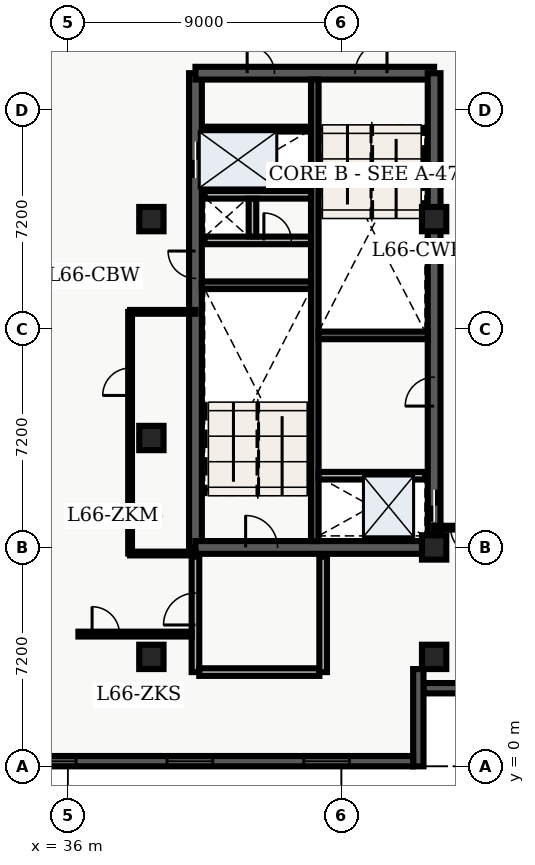
"""IFC4 building model, lengths in metres.
Left out: names, types, materials, properties, quantities, classifications, styles, units other than length and angle.
Written with IfcOpenShell. Run it as: python <this file> out.ifc"""

import sys

from ifc_helpers import new_model, entity, si_unit, converted_unit, direction, frame, origin_with_axes, origin_2d_with_axis, place, context, subcontext, project, spatial, polyline, rectangle, outline, extrude, element, fill, save


model = new_model("IFC4")
c1 = context("Model", 3, precision=1e-05, world=origin_with_axes(), true_north=direction((0.0, 1.0)))
c2 = subcontext(c1, "Body", "Model", "MODEL_VIEW")
j1 = project(units=[si_unit("LENGTHUNIT", "METRE"), converted_unit("PLANEANGLEUNIT", "DEGREE", entity("IfcPlaneAngleMeasure", 0.017), si_unit("PLANEANGLEUNIT", "RADIAN"), dimensions=[0, 0, 0, 0, 0, 0, 0])], contexts=[c1])
p1 = place(None, origin_with_axes())
s1 = spatial("IfcSite", under=j1, at=p1, CompositionType="ELEMENT")
p2 = place(p1, origin_with_axes())
s2 = spatial("IfcBuilding", under=s1, at=p2, CompositionType="ELEMENT")
p3 = place(p2, frame((0.0, 0.0, 268.5), z_axis=(0.0, 0.0, 1.0), x_axis=(1.0, 0.0, 0.0)))
s3 = spatial("IfcBuildingStorey", under=s2, at=p3, CompositionType="ELEMENT", Elevation=268.5)
p4 = place(p3, frame((40.2, 7.2, 0.0), z_axis=(0.0, 0.0, 1.0), x_axis=(0.0, 1.0, 0.0)))
e1 = element("IfcWall", 1, at=p4, inside=s3, PredefinedType="SHEAR", context=c2, shape_type="SweptSolid", body=[
    extrude(outline(polyline([(0.0, -0.21), (15.6, -0.21), (15.6, 0.21), (0.0, 0.21), (0.0, -0.21)])), origin_with_axes(), (0.0, 0.0, 1.0), 3.66),
])
p5 = place(p4, frame((12.75, 0.0, 0.0), z_axis=(0.0, 0.0, 1.0), x_axis=(1.0, 0.0, 0.0)))
e2 = element("IfcOpeningElement", 2, at=p5, cuts=e1, PredefinedType="OPENING", context=c2, shape_type="SweptSolid", body=[
    extrude(rectangle(XDim=1.2, YDim=0.44, at=origin_2d_with_axis()), origin_with_axes(), (0.0, 0.0, 1.0), 2.15),
])
p6 = place(p4, frame((9.3, 0.0, 0.0), z_axis=(0.0, 0.0, 1.0), x_axis=(1.0, 0.0, 0.0)))
e3 = element("IfcOpeningElement", 3, at=p6, cuts=e1, PredefinedType="OPENING", context=c2, shape_type="SweptSolid", body=[
    extrude(rectangle(XDim=0.9, YDim=0.44, at=origin_2d_with_axis()), origin_with_axes(), (0.0, 0.0, 1.0), 2.15),
])
p7 = place(p3, frame((40.2, 7.2, 0.0), z_axis=(0.0, 0.0, 1.0), x_axis=(1.0, 0.0, 0.0)))
e4 = element("IfcWall", 4, at=p7, inside=s3, PredefinedType="SHEAR", context=c2, shape_type="SweptSolid", body=[
    extrude(outline(polyline([(0.0, -0.21), (7.85, -0.21), (7.85, 0.21), (0.0, 0.21), (0.0, -0.21)])), origin_with_axes(), (0.0, 0.0, 1.0), 3.66),
])
p8 = place(p7, frame((2.175, 0.0, 0.0), z_axis=(0.0, 0.0, 1.0), x_axis=(1.0, 0.0, 0.0)))
e5 = element("IfcOpeningElement", 5, at=p8, cuts=e4, PredefinedType="OPENING", context=c2, shape_type="SweptSolid", body=[
    extrude(rectangle(XDim=1.05, YDim=0.44, at=origin_2d_with_axis()), origin_with_axes(), (0.0, 0.0, 1.0), 2.15),
])
p9 = place(p3, frame((40.2, 22.8, 0.0), z_axis=(0.0, 0.0, 1.0), x_axis=(1.0, 0.0, 0.0)))
e6 = element("IfcWall", 6, at=p9, inside=s3, PredefinedType="SHEAR", context=c2, shape_type="SweptSolid", body=[
    extrude(outline(polyline([(0.0, -0.21), (7.85, -0.21), (7.85, 0.21), (0.0, 0.21), (0.0, -0.21)])), origin_with_axes(), (0.0, 0.0, 1.0), 3.66),
])
p10 = place(p9, frame((5.775, 0.0, 0.0), z_axis=(0.0, 0.0, 1.0), x_axis=(1.0, 0.0, 0.0)))
e7 = element("IfcOpeningElement", 7, at=p10, cuts=e6, PredefinedType="OPENING", context=c2, shape_type="SweptSolid", body=[
    extrude(rectangle(XDim=1.05, YDim=0.44, at=origin_2d_with_axis()), origin_with_axes(), (0.0, 0.0, 1.0), 2.15),
])
p11 = place(p9, frame((2.15, 0.0, 0.0), z_axis=(0.0, 0.0, 1.0), x_axis=(1.0, 0.0, 0.0)))
e8 = element("IfcOpeningElement", 8, at=p11, cuts=e6, PredefinedType="OPENING", context=c2, shape_type="SweptSolid", body=[
    extrude(rectangle(XDim=0.9, YDim=0.44, at=origin_2d_with_axis()), origin_with_axes(), (0.0, 0.0, 1.0), 2.15),
])
p12 = place(p3, frame((48.05, 7.2, 0.0), z_axis=(0.0, 0.0, 1.0), x_axis=(0.0, 1.0, 0.0)))
e9 = element("IfcWall", 9, at=p12, inside=s3, PredefinedType="SHEAR", context=c2, shape_type="SweptSolid", body=[
    extrude(outline(polyline([(0.0, -0.21), (15.6, -0.21), (15.6, 0.21), (0.0, 0.21), (0.0, -0.21)])), origin_with_axes(), (0.0, 0.0, 1.0), 3.66),
])
p13 = place(p12, frame((1.375, 0.0, 0.0), z_axis=(0.0, 0.0, 1.0), x_axis=(1.0, 0.0, 0.0)))
e10 = element("IfcOpeningElement", 10, at=p13, cuts=e9, PredefinedType="OPENING", context=c2, shape_type="SweptSolid", body=[
    extrude(rectangle(XDim=1.05, YDim=0.44, at=origin_2d_with_axis()), origin_with_axes(), (0.0, 0.0, 1.0), 2.15),
])
p14 = place(p12, frame((5.125, 0.0, 0.0), z_axis=(0.0, 0.0, 1.0), x_axis=(1.0, 0.0, 0.0)))
e11 = element("IfcOpeningElement", 11, at=p14, cuts=e9, PredefinedType="OPENING", context=c2, shape_type="SweptSolid", body=[
    extrude(rectangle(XDim=0.95, YDim=0.44, at=origin_2d_with_axis()), origin_with_axes(), (0.0, 0.0, 1.0), 2.15),
])
p15 = place(p3, frame((44.125, 7.41, 0.0), z_axis=(0.0, 0.0, 1.0), x_axis=(0.0, 1.0, 0.0)))
e12 = element("IfcWall", 12, at=p15, inside=s3, PredefinedType="SHEAR", context=c2, shape_type="SweptSolid", body=[
    extrude(outline(polyline([(0.0, -0.125), (15.18, -0.125), (15.18, 0.125), (0.0, 0.125), (0.0, -0.125)])), origin_with_axes(), (0.0, 0.0, 1.0), 3.66),
])
for number, where, z_axis, x_axis in (
    (13, (40.41, 15.825, 0.0), (0.0, 0.0, 1.0), (1.0, 0.0, 0.0)),
    (14, (44.25, 14.175, 0.0), (0.0, 0.0, 1.0), (1.0, 0.0, 0.0)),
):
    element("IfcWall", number, at=place(p3, frame(where, z_axis=z_axis, x_axis=x_axis)), inside=s3, PredefinedType="SHEAR", context=c2, shape_type="SweptSolid", body=[
        extrude(outline(polyline([(0.0, -0.125), (3.59, -0.125), (3.59, 0.125), (0.0, 0.125), (0.0, -0.125)])), origin_with_axes(), (0.0, 0.0, 1.0), 3.66),
    ])
p16 = place(p3, frame((40.5, 17.3, 0.0), z_axis=(0.0, 0.0, 1.0), x_axis=(1.0, 0.0, 0.0)))
e15 = element("IfcWall", 15, at=p16, inside=s3, PredefinedType="SOLIDWALL", context=c2, shape_type="SweptSolid", body=[
    extrude(outline(polyline([(0.0, -0.125), (3.5, -0.125), (3.5, 0.125), (0.0, 0.125), (0.0, -0.125)])), origin_with_axes(), (0.0, 0.0, 1.0), 2.7),
])
p17 = place(p16, frame((2.4, 0.0, 0.0), z_axis=(0.0, 0.0, 1.0), x_axis=(1.0, 0.0, 0.0)))
e16 = element("IfcOpeningElement", 16, at=p17, cuts=e15, PredefinedType="OPENING", context=c2, shape_type="SweptSolid", body=[
    extrude(rectangle(XDim=0.9, YDim=0.27, at=origin_2d_with_axis()), origin_with_axes(), (0.0, 0.0, 1.0), 2.15),
])
p18 = place(p3, frame((40.5, 18.8, 0.0), z_axis=(0.0, 0.0, 1.0), x_axis=(1.0, 0.0, 0.0)))
e17 = element("IfcWall", 17, at=p18, inside=s3, PredefinedType="SOLIDWALL", context=c2, shape_type="SweptSolid", body=[
    extrude(outline(polyline([(0.0, -0.125), (3.5, -0.125), (3.5, 0.125), (0.0, 0.125), (0.0, -0.125)])), origin_with_axes(), (0.0, 0.0, 1.0), 2.7),
])
p19 = place(p3, frame((42.075, 17.43, 0.0), z_axis=(0.0, 0.0, 1.0), x_axis=(0.0, 1.0, 0.0)))
e18 = element("IfcWall", 18, at=p19, inside=s3, PredefinedType="SOLIDWALL", context=c2, shape_type="SweptSolid", body=[
    extrude(outline(polyline([(0.0, -0.125), (1.24, -0.125), (1.24, 0.125), (0.0, 0.125), (0.0, -0.125)])), origin_with_axes(), (0.0, 0.0, 1.0), 2.7),
])
p20 = place(p3, frame((40.2, 3.1, 0.0), z_axis=(0.0, 0.0, 1.0), x_axis=(0.0, 1.0, 0.0)))
e19 = element("IfcWall", 19, at=p20, inside=s3, PredefinedType="SOLIDWALL", context=c2, shape_type="SweptSolid", body=[
    extrude(outline(polyline([(0.0, -0.125), (3.8, -0.125), (3.8, 0.125), (0.0, 0.125), (0.0, -0.125)])), origin_with_axes(), (0.0, 0.0, 1.0), 2.7),
])
p21 = place(p20, frame((2.075, 0.0, 0.0), z_axis=(0.0, 0.0, 1.0), x_axis=(1.0, 0.0, 0.0)))
e20 = element("IfcOpeningElement", 20, at=p21, cuts=e19, PredefinedType="OPENING", context=c2, shape_type="SweptSolid", body=[
    extrude(rectangle(XDim=1.05, YDim=0.27, at=origin_2d_with_axis()), origin_with_axes(), (0.0, 0.0, 1.0), 2.15),
])
p22 = place(p3, frame((40.325, 3.1, 0.0), z_axis=(0.0, 0.0, 1.0), x_axis=(1.0, 0.0, 0.0)))
e21 = element("IfcWall", 21, at=p22, inside=s3, PredefinedType="SOLIDWALL", context=c2, shape_type="SweptSolid", body=[
    extrude(outline(polyline([(0.0, -0.125), (3.95, -0.125), (3.95, 0.125), (0.0, 0.125), (0.0, -0.125)])), origin_with_axes(), (0.0, 0.0, 1.0), 2.7),
])
p23 = place(p3, frame((44.4, 3.1, 0.0), z_axis=(0.0, 0.0, 1.0), x_axis=(0.0, 1.0, 0.0)))
e22 = element("IfcWall", 22, at=p23, inside=s3, PredefinedType="SOLIDWALL", context=c2, shape_type="SweptSolid", body=[
    extrude(outline(polyline([(0.0, -0.125), (3.8, -0.125), (3.8, 0.125), (0.0, 0.125), (0.0, -0.125)])), origin_with_axes(), (0.0, 0.0, 1.0), 2.7),
])
for number, where, z_axis, x_axis in (
    (23, (38.75, 3.6, 0.0), (0.0, 0.0, 1.0), (1.0, 0.0, 0.0)),
    (24, (38.75, 10.8, 0.0), (0.0, 0.0, 1.0), (1.0, 0.0, 0.0)),
    (25, (38.75, 18.0, 0.0), (0.0, 0.0, 1.0), (1.0, 0.0, 0.0)),
    (26, (48.05, 3.6, 0.0), (0.0, 0.0, 1.0), (1.0, 0.0, 0.0)),
    (27, (48.05, 7.2, 0.0), (0.0, 0.0, 1.0), (1.0, 0.0, 0.0)),
    (28, (48.05, 18.0, 0.0), (0.0, 0.0, 1.0), (1.0, 0.0, 0.0)),
):
    element("IfcColumn", number, at=place(p3, frame(where, z_axis=z_axis, x_axis=x_axis)), inside=s3, PredefinedType="COLUMN", context=c2, shape_type="SweptSolid", body=[
        extrude(rectangle(XDim=0.8, YDim=0.8, at=origin_2d_with_axis()), origin_with_axes(), (0.0, 0.0, 1.0), 3.9),
    ])
p24 = place(p3, frame((40.5, 20.96, 0.0), z_axis=(0.0, 0.0, 1.0), x_axis=(1.0, 0.0, 0.0)))
e29 = element("IfcWall", 29, at=p24, inside=s3, PredefinedType="PARTITIONING", context=c2, shape_type="SweptSolid", body=[
    extrude(outline(polyline([(0.0, -0.08), (3.5, -0.08), (3.5, 0.08), (0.0, 0.08), (0.0, -0.08)])), origin_with_axes(), (0.0, 0.0, 1.0), 2.7),
])
p25 = place(p3, frame((44.25, 9.56, 0.0), z_axis=(0.0, 0.0, 1.0), x_axis=(1.0, 0.0, 0.0)))
e30 = element("IfcWall", 30, at=p25, inside=s3, PredefinedType="SOLIDWALL", context=c2, shape_type="SweptSolid", body=[
    extrude(outline(polyline([(0.0, -0.125), (3.5, -0.125), (3.5, 0.125), (0.0, 0.125), (0.0, -0.125)])), origin_with_axes(), (0.0, 0.0, 1.0), 2.7),
])
p26 = place(p3, frame((49.765, 7.85, 0.0), z_axis=(0.0, 0.0, 1.0), x_axis=(-1.0, 0.0, 0.0)))
e31 = element("IfcWall", 31, at=p26, inside=s3, PredefinedType="PARTITIONING", context=c2, shape_type="SweptSolid", body=[
    extrude(outline(polyline([(0.0, -0.062), (1.715, -0.062), (1.715, 0.062), (0.0, 0.062), (0.0, -0.062)])), origin_with_axes(), (0.0, 0.0, 1.0), 2.7),
])
p27 = place(p26, frame((0.725, 0.0, 0.0), z_axis=(0.0, 0.0, 1.0), x_axis=(1.0, 0.0, 0.0)))
e32 = element("IfcOpeningElement", 32, at=p27, cuts=e31, PredefinedType="OPENING", context=c2, shape_type="SweptSolid", body=[
    extrude(rectangle(XDim=0.9, YDim=0.145, at=origin_2d_with_axis()), origin_with_axes(), (0.0, 0.0, 1.0), 2.15),
])
p28 = place(p3, frame((36.35, 4.35, 0.0), z_axis=(0.0, 0.0, 1.0), x_axis=(1.0, 0.0, 0.0)))
e33 = element("IfcWall", 33, at=p28, inside=s3, PredefinedType="PARTITIONING", context=c2, shape_type="SweptSolid", body=[
    extrude(outline(polyline([(0.0, -0.08), (3.725, -0.08), (3.725, 0.08), (0.0, 0.08), (0.0, -0.08)])), origin_with_axes(), (0.0, 0.0, 1.0), 2.7),
])
p29 = place(p28, frame((0.9, 0.0, 0.0), z_axis=(0.0, 0.0, 1.0), x_axis=(1.0, 0.0, 0.0)))
e34 = element("IfcOpeningElement", 34, at=p29, cuts=e33, PredefinedType="OPENING", context=c2, shape_type="SweptSolid", body=[
    extrude(rectangle(XDim=0.9, YDim=0.18, at=origin_2d_with_axis()), origin_with_axes(), (0.0, 0.0, 1.0), 2.15),
])
for number, where, z_axis, x_axis in (
    (35, (38.05, 7.0, 0.0), (0.0, 0.0, 1.0), (1.0, 0.0, 0.0)),
    (36, (38.05, 14.95, 0.0), (0.0, 0.0, 1.0), (1.0, 0.0, 0.0)),
):
    element("IfcWall", number, at=place(p3, frame(where, z_axis=z_axis, x_axis=x_axis)), inside=s3, PredefinedType="PARTITIONING", context=c2, shape_type="SweptSolid", body=[
        extrude(outline(polyline([(0.0, -0.062), (2.15, -0.062), (2.15, 0.062), (0.0, 0.062), (0.0, -0.062)])), origin_with_axes(), (0.0, 0.0, 1.0), 2.7),
    ])
p30 = place(p3, frame((38.05, 7.0, 0.0), z_axis=(0.0, 0.0, 1.0), x_axis=(0.0, 1.0, 0.0)))
e37 = element("IfcWall", 37, at=p30, inside=s3, PredefinedType="PARTITIONING", context=c2, shape_type="SweptSolid", body=[
    extrude(outline(polyline([(0.0, -0.062), (7.95, -0.062), (7.95, 0.062), (0.0, 0.062), (0.0, -0.062)])), origin_with_axes(), (0.0, 0.0, 1.0), 2.7),
])
p31 = place(p30, frame((5.65, 0.0, 0.0), z_axis=(0.0, 0.0, 1.0), x_axis=(1.0, 0.0, 0.0)))
e38 = element("IfcOpeningElement", 38, at=p31, cuts=e37, PredefinedType="OPENING", context=c2, shape_type="SweptSolid", body=[
    extrude(rectangle(XDim=0.9, YDim=0.145, at=origin_2d_with_axis()), origin_with_axes(), (0.0, 0.0, 1.0), 2.15),
])
p32 = place(p3, frame((49.76, 2.57, 0.0), z_axis=(0.0, 0.0, 1.0), x_axis=(-1.0, 0.0, 0.0)))
e39 = element("IfcWall", 39, at=p32, inside=s3, PredefinedType="SOLIDWALL", context=c2, shape_type="SweptSolid", body=[
    extrude(outline(polyline([(0.0, -0.17), (2.06, -0.17), (2.06, 0.17), (0.0, 0.17), (0.0, -0.17)])), origin_with_axes(), (0.0, 0.0, 1.0), 3.66),
])
p33 = place(p3, frame((47.53, 3.2, 0.0), z_axis=(0.0, 0.0, 1.0), x_axis=(0.0, -1.0, 0.0)))
e40 = element("IfcWall", 40, at=p33, inside=s3, PredefinedType="SOLIDWALL", context=c2, shape_type="SweptSolid", body=[
    extrude(outline(polyline([(0.0, -0.17), (3.2, -0.17), (3.2, 0.17), (0.0, 0.17), (0.0, -0.17)])), origin_with_axes(), (0.0, 0.0, 1.0), 3.66),
])
p34 = place(p3, frame((47.36, 0.17, 0.0), z_axis=(0.0, 0.0, 1.0), x_axis=(-1.0, 0.0, 0.0)))
e41 = element("IfcWall", 41, at=p34, inside=s3, PredefinedType="SOLIDWALL", context=c2, shape_type="SweptSolid", body=[
    extrude(outline(polyline([(0.0, -0.17), (37.16, -0.17), (37.16, 0.17), (0.0, 0.17), (0.0, -0.17)])), origin_with_axes(), (0.0, 0.0, 1.0), 3.66),
])
p35 = place(p34, frame((2.847, 0.0, 0.45), z_axis=(0.0, 0.0, 1.0), x_axis=(1.0, 0.0, 0.0)))
e42 = element("IfcOpeningElement", 42, at=p35, cuts=e41, PredefinedType="OPENING", context=c2, shape_type="SweptSolid", body=[
    extrude(rectangle(XDim=1.5, YDim=0.36, at=origin_2d_with_axis()), origin_with_axes(), (0.0, 0.0, 1.0), 2.1),
])
p36 = place(p34, frame((7.342, 0.0, 0.45), z_axis=(0.0, 0.0, 1.0), x_axis=(1.0, 0.0, 0.0)))
e43 = element("IfcOpeningElement", 43, at=p36, cuts=e41, PredefinedType="OPENING", context=c2, shape_type="SweptSolid", body=[
    extrude(rectangle(XDim=1.5, YDim=0.36, at=origin_2d_with_axis()), origin_with_axes(), (0.0, 0.0, 1.0), 2.1),
])
p37 = place(p34, frame((11.837, 0.0, 0.45), z_axis=(0.0, 0.0, 1.0), x_axis=(1.0, 0.0, 0.0)))
e44 = element("IfcOpeningElement", 44, at=p37, cuts=e41, PredefinedType="OPENING", context=c2, shape_type="SweptSolid", body=[
    extrude(rectangle(XDim=1.5, YDim=0.36, at=origin_2d_with_axis()), origin_with_axes(), (0.0, 0.0, 1.0), 2.1),
])
p38 = place(p34, frame((16.332, 0.0, 0.45), z_axis=(0.0, 0.0, 1.0), x_axis=(1.0, 0.0, 0.0)))
e45 = element("IfcOpeningElement", 45, at=p38, cuts=e41, PredefinedType="OPENING", context=c2, shape_type="SweptSolid", body=[
    extrude(rectangle(XDim=1.5, YDim=0.36, at=origin_2d_with_axis()), origin_with_axes(), (0.0, 0.0, 1.0), 2.1),
])
p39 = place(p34, frame((20.827, 0.0, 0.45), z_axis=(0.0, 0.0, 1.0), x_axis=(1.0, 0.0, 0.0)))
e46 = element("IfcOpeningElement", 46, at=p39, cuts=e41, PredefinedType="OPENING", context=c2, shape_type="SweptSolid", body=[
    extrude(rectangle(XDim=1.5, YDim=0.36, at=origin_2d_with_axis()), origin_with_axes(), (0.0, 0.0, 1.0), 2.1),
])
p40 = place(p34, frame((25.322, 0.0, 0.45), z_axis=(0.0, 0.0, 1.0), x_axis=(1.0, 0.0, 0.0)))
e47 = element("IfcOpeningElement", 47, at=p40, cuts=e41, PredefinedType="OPENING", context=c2, shape_type="SweptSolid", body=[
    extrude(rectangle(XDim=1.5, YDim=0.36, at=origin_2d_with_axis()), origin_with_axes(), (0.0, 0.0, 1.0), 2.1),
])
p41 = place(p34, frame((29.817, 0.0, 0.45), z_axis=(0.0, 0.0, 1.0), x_axis=(1.0, 0.0, 0.0)))
e48 = element("IfcOpeningElement", 48, at=p41, cuts=e41, PredefinedType="OPENING", context=c2, shape_type="SweptSolid", body=[
    extrude(rectangle(XDim=1.5, YDim=0.36, at=origin_2d_with_axis()), origin_with_axes(), (0.0, 0.0, 1.0), 2.1),
])
p42 = place(p34, frame((34.312, 0.0, 0.45), z_axis=(0.0, 0.0, 1.0), x_axis=(1.0, 0.0, 0.0)))
e49 = element("IfcOpeningElement", 49, at=p42, cuts=e41, PredefinedType="OPENING", context=c2, shape_type="SweptSolid", body=[
    extrude(rectangle(XDim=1.5, YDim=0.36, at=origin_2d_with_axis()), origin_with_axes(), (0.0, 0.0, 1.0), 2.1),
])
p43 = place(p12, frame((1.375, 0.0, 0.0), z_axis=(0.0, 0.0, 1.0), x_axis=(1.0, 0.0, 0.0)))
e50 = element("IfcDoor", 50, at=p43, inside=s3, OperationType="SLIDING_TO_LEFT", PredefinedType="DOOR", context=c2, shape_type="SweptSolid", body=[
    extrude(rectangle(XDim=1.05, YDim=0.09, at=origin_2d_with_axis()), origin_with_axes(), (0.0, 0.0, 1.0), 2.15),
])
fill(e10, e50)
p44 = place(p4, frame((12.75, 0.0, 0.0), z_axis=(0.0, 0.0, 1.0), x_axis=(1.0, 0.0, 0.0)))
e51 = element("IfcDoor", 51, at=p44, inside=s3, OperationType="DOUBLE_DOOR_SLIDING", PredefinedType="DOOR", context=c2, shape_type="SweptSolid", body=[
    extrude(rectangle(XDim=1.2, YDim=0.09, at=origin_2d_with_axis()), origin_with_axes(), (0.0, 0.0, 1.0), 2.15),
])
fill(e2, e51)
p45 = place(p4, frame((9.3, 0.0, 0.0), z_axis=(0.0, 0.0, 1.0), x_axis=(1.0, 0.0, 0.0)))
e52 = element("IfcDoor", 52, at=p45, inside=s3, OperationType="SINGLE_SWING_RIGHT", PredefinedType="DOOR", context=c2, shape_type="SweptSolid", body=[
    extrude(rectangle(XDim=0.9, YDim=0.09, at=origin_2d_with_axis()), origin_with_axes(), (0.0, 0.0, 1.0), 2.15),
])
fill(e3, e52)
p46 = place(p16, frame((2.4, 0.0, 0.0), z_axis=(0.0, 0.0, 1.0), x_axis=(1.0, 0.0, 0.0)))
e53 = element("IfcDoor", 53, at=p46, inside=s3, OperationType="SINGLE_SWING_LEFT", PredefinedType="DOOR", context=c2, shape_type="SweptSolid", body=[
    extrude(rectangle(XDim=0.9, YDim=0.09, at=origin_2d_with_axis()), origin_with_axes(), (0.0, 0.0, 1.0), 2.15),
])
fill(e16, e53)
p47 = place(p7, frame((2.175, 0.0, 0.0), z_axis=(0.0, 0.0, 1.0), x_axis=(1.0, 0.0, 0.0)))
e54 = element("IfcDoor", 54, at=p47, inside=s3, OperationType="SINGLE_SWING_LEFT", PredefinedType="DOOR", context=c2, shape_type="SweptSolid", body=[
    extrude(rectangle(XDim=1.05, YDim=0.09, at=origin_2d_with_axis()), origin_with_axes(), (0.0, 0.0, 1.0), 2.15),
])
fill(e5, e54)
p48 = place(p9, frame((5.775, 0.0, 0.0), z_axis=(0.0, 0.0, 1.0), x_axis=(1.0, 0.0, 0.0)))
e55 = element("IfcDoor", 55, at=p48, inside=s3, OperationType="SINGLE_SWING_RIGHT", PredefinedType="DOOR", context=c2, shape_type="SweptSolid", body=[
    extrude(rectangle(XDim=1.05, YDim=0.09, at=origin_2d_with_axis()), origin_with_axes(), (0.0, 0.0, 1.0), 2.15),
])
fill(e7, e55)
p49 = place(p20, frame((2.075, 0.0, 0.0), z_axis=(0.0, 0.0, 1.0), x_axis=(1.0, 0.0, 0.0)))
e56 = element("IfcDoor", 56, at=p49, inside=s3, OperationType="SINGLE_SWING_LEFT", PredefinedType="DOOR", context=c2, shape_type="SweptSolid", body=[
    extrude(rectangle(XDim=1.05, YDim=0.09, at=origin_2d_with_axis()), origin_with_axes(), (0.0, 0.0, 1.0), 2.15),
])
fill(e20, e56)
p50 = place(p9, frame((2.15, 0.0, 0.0), z_axis=(0.0, 0.0, 1.0), x_axis=(1.0, 0.0, 0.0)))
e57 = element("IfcDoor", 57, at=p50, inside=s3, OperationType="SINGLE_SWING_LEFT", PredefinedType="DOOR", context=c2, shape_type="SweptSolid", body=[
    extrude(rectangle(XDim=0.9, YDim=0.09, at=origin_2d_with_axis()), origin_with_axes(), (0.0, 0.0, 1.0), 2.15),
])
fill(e8, e57)
p51 = place(p12, frame((5.125, 0.0, 0.0), z_axis=(0.0, 0.0, 1.0), x_axis=(1.0, 0.0, 0.0)))
e58 = element("IfcDoor", 58, at=p51, inside=s3, OperationType="SINGLE_SWING_LEFT", PredefinedType="DOOR", context=c2, shape_type="SweptSolid", body=[
    extrude(rectangle(XDim=0.95, YDim=0.09, at=origin_2d_with_axis()), origin_with_axes(), (0.0, 0.0, 1.0), 2.15),
])
fill(e11, e58)
p52 = place(p26, frame((0.725, 0.0, 0.0), z_axis=(0.0, 0.0, 1.0), x_axis=(1.0, 0.0, 0.0)))
e59 = element("IfcDoor", 59, at=p52, inside=s3, OperationType="SINGLE_SWING_LEFT", PredefinedType="DOOR", context=c2, shape_type="SweptSolid", body=[
    extrude(rectangle(XDim=0.9, YDim=0.075, at=origin_2d_with_axis()), origin_with_axes(), (0.0, 0.0, 1.0), 2.15),
])
fill(e32, e59)
p53 = place(p28, frame((0.9, 0.0, 0.0), z_axis=(0.0, 0.0, 1.0), x_axis=(1.0, 0.0, 0.0)))
e60 = element("IfcDoor", 60, at=p53, inside=s3, OperationType="SINGLE_SWING_LEFT", PredefinedType="DOOR", context=c2, shape_type="SweptSolid", body=[
    extrude(rectangle(XDim=0.9, YDim=0.09, at=origin_2d_with_axis()), origin_with_axes(), (0.0, 0.0, 1.0), 2.15),
])
fill(e34, e60)
p54 = place(p30, frame((5.65, 0.0, 0.0), z_axis=(0.0, 0.0, 1.0), x_axis=(1.0, 0.0, 0.0)))
e61 = element("IfcDoor", 61, at=p54, inside=s3, OperationType="SINGLE_SWING_LEFT", PredefinedType="DOOR", context=c2, shape_type="SweptSolid", body=[
    extrude(rectangle(XDim=0.9, YDim=0.075, at=origin_2d_with_axis()), origin_with_axes(), (0.0, 0.0, 1.0), 2.15),
])
fill(e38, e61)
p55 = place(p34, frame((2.847, 0.0, 0.45), z_axis=(0.0, 0.0, 1.0), x_axis=(1.0, 0.0, 0.0)))
e62 = element("IfcWindow", 62, at=p55, inside=s3, PredefinedType="WINDOW", context=c2, shape_type="SweptSolid", body=[
    extrude(rectangle(XDim=1.5, YDim=0.09, at=origin_2d_with_axis()), origin_with_axes(), (0.0, 0.0, 1.0), 2.1),
])
fill(e42, e62)
p56 = place(p34, frame((7.342, 0.0, 0.45), z_axis=(0.0, 0.0, 1.0), x_axis=(1.0, 0.0, 0.0)))
e63 = element("IfcWindow", 63, at=p56, inside=s3, PredefinedType="WINDOW", context=c2, shape_type="SweptSolid", body=[
    extrude(rectangle(XDim=1.5, YDim=0.09, at=origin_2d_with_axis()), origin_with_axes(), (0.0, 0.0, 1.0), 2.1),
])
fill(e43, e63)
p57 = place(p34, frame((11.837, 0.0, 0.45), z_axis=(0.0, 0.0, 1.0), x_axis=(1.0, 0.0, 0.0)))
e64 = element("IfcWindow", 64, at=p57, inside=s3, PredefinedType="WINDOW", context=c2, shape_type="SweptSolid", body=[
    extrude(rectangle(XDim=1.5, YDim=0.09, at=origin_2d_with_axis()), origin_with_axes(), (0.0, 0.0, 1.0), 2.1),
])
fill(e44, e64)
save(model, sys.argv[1])
